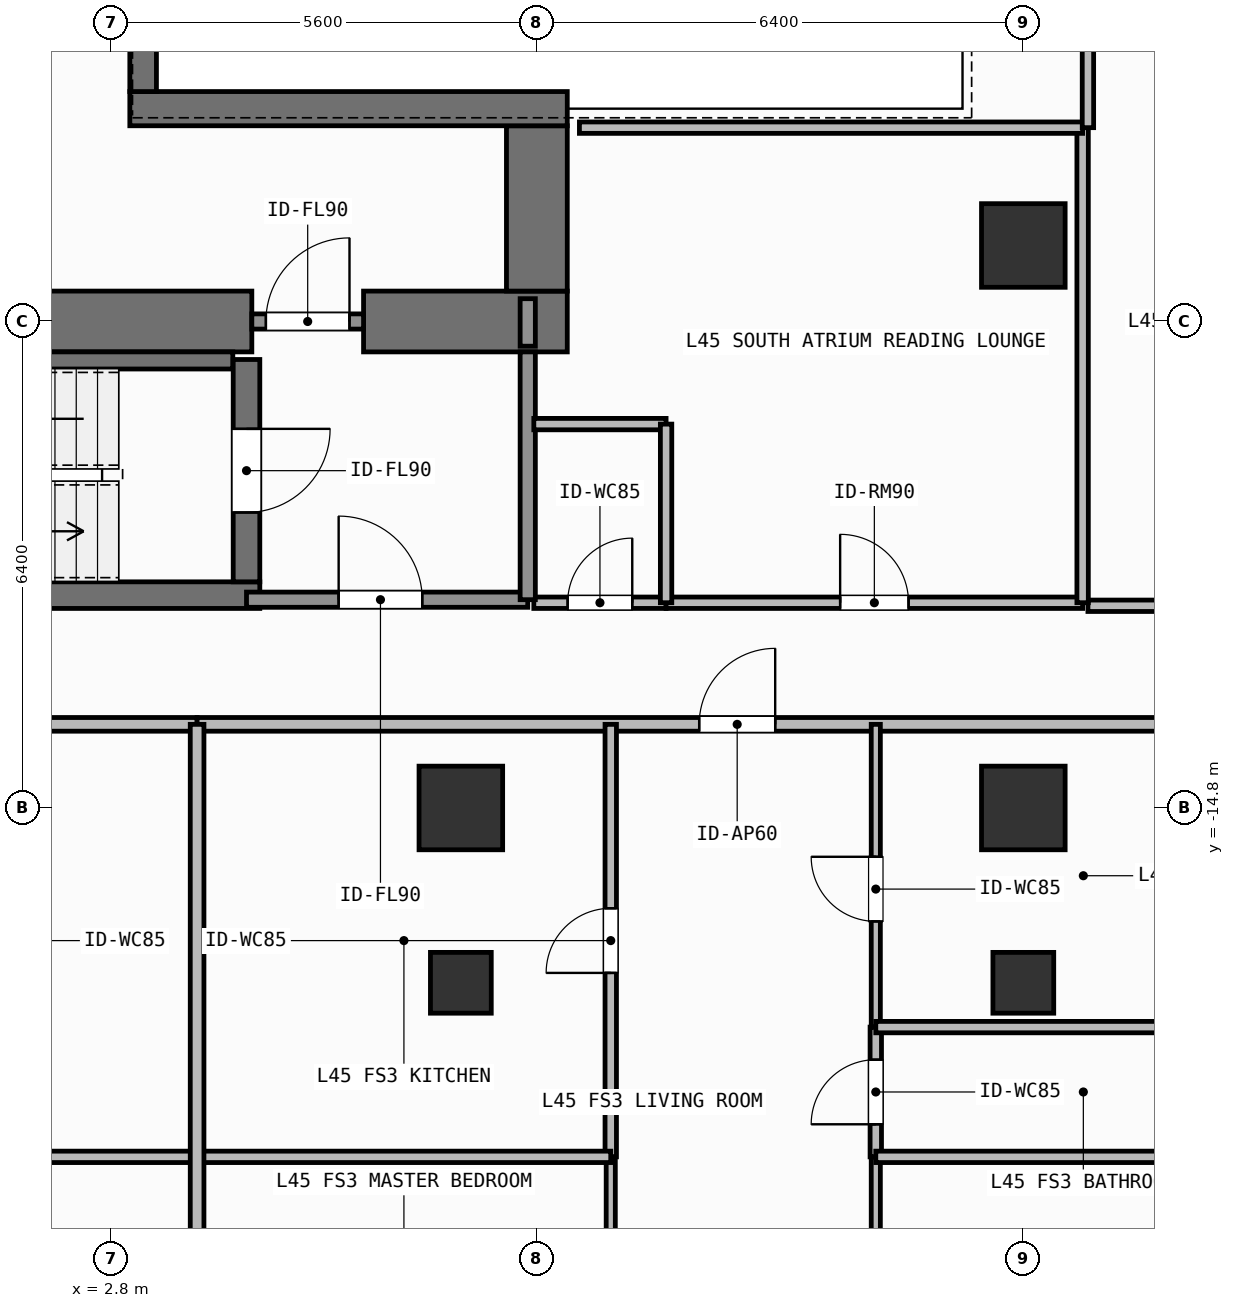
"""IFC4 building model, lengths in metres.
Left out: names, types, materials, properties, quantities, classifications, styles, units other than length and angle.
Written with IfcOpenShell. Run it as: python <this file> out.ifc"""

import sys

from ifc_helpers import new_model, si_unit, direction, frame, frame_2d, origin, origin_2d, place, context, subcontext, project, spatial, rectangle, hollow_rectangle, extrude, element, fill, save


model = new_model("IFC4")
c1 = context("Model", 3, precision=1e-05, world=origin(), true_north=direction((0.0, 1.0)))
c2 = subcontext(c1, "Body", "Model", "MODEL_VIEW")
j1 = project(units=[si_unit("LENGTHUNIT", "METRE"), si_unit("PLANEANGLEUNIT", "RADIAN")], contexts=[c1])
p1 = place(None, origin())
s1 = spatial("IfcSite", under=j1, at=p1, CompositionType="ELEMENT")
p2 = place(p1, origin())
s2 = spatial("IfcBuilding", under=s1, at=p2, CompositionType="ELEMENT")
p3 = place(p2, frame((0.0, 0.0, 183.6)))
s3 = spatial("IfcBuildingStorey", under=s2, at=p3, CompositionType="ELEMENT", Elevation=183.6)
p4 = place(p3, frame((-2.62, -8.4, 0.0), z_axis=(0.0, 0.0, 1.0), x_axis=(1.0, 0.0, 0.0)))
e1 = element("IfcWall", 1, at=p4, inside=s3, PredefinedType="SHEAR", context=c2, shape_type="SweptSolid", body=[
    extrude(rectangle(XDim=7.27, YDim=0.8, at=frame_2d((3.635, 0.0))), origin(), (0.0, 0.0, 1.0), 3.9),
])
p5 = place(p3, frame((6.12, -8.4, 0.0), z_axis=(0.0, 0.0, 1.0), x_axis=(1.0, 0.0, 0.0)))
e2 = element("IfcWall", 2, at=p5, inside=s3, PredefinedType="SHEAR", context=c2, shape_type="SweptSolid", body=[
    extrude(rectangle(XDim=2.68, YDim=0.8, at=frame_2d((1.34, 0.0))), origin(), (0.0, 0.0, 1.0), 3.9),
])
p6 = place(p3, frame((8.4, -8.0, 0.0), z_axis=(0.0, 0.0, 1.0), x_axis=(0.0, 1.0, 0.0)))
e3 = element("IfcWall", 3, at=p6, inside=s3, PredefinedType="SHEAR", context=c2, shape_type="SweptSolid", body=[
    extrude(rectangle(XDim=2.175, YDim=0.8, at=frame_2d((1.087, 0.0))), origin(), (0.0, 0.0, 1.0), 3.9),
])
p7 = place(p3, frame((3.045, -5.6, 0.0), z_axis=(0.0, 0.0, 1.0), x_axis=(1.0, 0.0, 0.0)))
e4 = element("IfcWall", 4, at=p7, inside=s3, PredefinedType="SHEAR", context=c2, shape_type="SweptSolid", body=[
    extrude(rectangle(XDim=5.755, YDim=0.45, at=frame_2d((2.877, 0.0))), origin(), (0.0, 0.0, 1.0), 3.9),
])
p8 = place(p3, frame((3.22, -5.375, 0.0), z_axis=(0.0, 0.0, 1.0), x_axis=(0.0, 1.0, 0.0)))
e5 = element("IfcWall", 5, at=p8, inside=s3, PredefinedType="SHEAR", context=c2, shape_type="SweptSolid", body=[
    extrude(rectangle(XDim=10.75, YDim=0.35, at=frame_2d((5.375, 0.0))), origin(), (0.0, 0.0, 1.0), 3.9),
])
p9 = place(p3, frame((-2.555, -12.0, 0.0), z_axis=(0.0, 0.0, 1.0), x_axis=(1.0, 0.0, 0.0)))
e6 = element("IfcWall", 6, at=p9, inside=s3, PredefinedType="SHEAR", context=c2, shape_type="SweptSolid", body=[
    extrude(rectangle(XDim=7.31, YDim=0.35, at=frame_2d((3.655, 0.0))), origin(), (0.0, 0.0, 1.0), 3.9),
])
p10 = place(p3, frame((-2.2, -8.913, 0.0), z_axis=(0.0, 0.0, 1.0), x_axis=(1.0, 0.0, 0.0)))
e7 = element("IfcWall", 7, at=p10, inside=s3, PredefinedType="SHEAR", context=c2, shape_type="SweptSolid", body=[
    extrude(rectangle(XDim=6.6, YDim=0.225, at=frame_2d((3.3, 0.0))), origin(), (0.0, 0.0, 1.0), 3.9),
])
p11 = place(p3, frame((4.58, -8.9, 0.0), z_axis=(0.0, 0.0, 1.0), x_axis=(0.0, -1.0, 0.0)))
e8 = element("IfcWall", 8, at=p11, inside=s3, PredefinedType="SHEAR", context=c2, shape_type="SweptSolid", body=[
    extrude(rectangle(XDim=2.925, YDim=0.35, at=frame_2d((1.462, 0.0))), origin(), (0.0, 0.0, 1.0), 3.9),
])
p12 = place(p11, frame((0.913, 0.0, 0.0)))
e9 = element("IfcOpeningElement", 9, at=p12, cuts=e8, PredefinedType="OPENING", context=c2, shape_type="SweptSolid", body=[
    extrude(rectangle(XDim=1.1, YDim=2.15, at=frame_2d((0.55, 1.075))), frame((0.0, 0.185, 0.0), z_axis=(0.0, -1.0, 0.0), x_axis=(1.0, 0.0, 0.0)), (0.0, 0.0, 1.0), 0.37),
])
for number, where, z_axis, x_axis in (
    (10, (7.4, -14.8, 0.0), (0.0, 0.0, 1.0), (1.0, 0.0, 0.0)),
    (11, (14.8, -14.8, 0.0), (0.0, 0.0, 1.0), (1.0, 0.0, 0.0)),
    (12, (14.8, -7.4, 0.0), (0.0, 0.0, 1.0), (1.0, 0.0, 0.0)),
):
    element("IfcColumn", number, at=place(p3, frame(where, z_axis=z_axis, x_axis=x_axis)), inside=s3, PredefinedType="COLUMN", context=c2, shape_type="SweptSolid", body=[
        extrude(rectangle(XDim=1.1, YDim=1.1, at=origin_2d()), origin(), (0.0, 0.0, 1.0), 3.9),
    ])
for number, where, z_axis, x_axis in (
    (13, (7.4, -17.1, 0.0), (0.0, 0.0, 1.0), (1.0, 0.0, 0.0)),
    (14, (14.8, -17.1, 0.0), (0.0, 0.0, 1.0), (1.0, 0.0, 0.0)),
):
    element("IfcColumn", number, at=place(p3, frame(where, z_axis=z_axis, x_axis=x_axis)), inside=s3, PredefinedType="COLUMN", context=c2, shape_type="SweptSolid", body=[
        extrude(hollow_rectangle(XDim=0.8, YDim=0.8, WallThickness=0.036, at=origin_2d()), origin(), (0.0, 0.0, 1.0), 3.9),
    ])
p13 = place(p3, frame((4.58, -12.06, 0.0), z_axis=(0.0, 0.0, 1.0), x_axis=(1.0, 0.0, 0.0)))
e15 = element("IfcWall", 15, at=p13, inside=s3, PredefinedType="SOLIDWALL", context=c2, shape_type="SweptSolid", body=[
    extrude(rectangle(XDim=3.7, YDim=0.2, at=frame_2d((1.85, 0.0))), origin(), (0.0, 0.0, 1.0), 3.68),
])
p14 = place(p13, frame((1.212, 0.0, 0.0)))
e16 = element("IfcOpeningElement", 16, at=p14, cuts=e15, PredefinedType="OPENING", context=c2, shape_type="SweptSolid", body=[
    extrude(rectangle(XDim=1.1, YDim=2.15, at=frame_2d((0.55, 1.075))), frame((0.0, 0.11, 0.0), z_axis=(0.0, -1.0, 0.0), x_axis=(1.0, 0.0, 0.0)), (0.0, 0.0, 1.0), 0.22),
])
p15 = place(p3, frame((4.65, -8.4, 0.0), z_axis=(0.0, 0.0, 1.0), x_axis=(1.0, 0.0, 0.0)))
e17 = element("IfcWall", 17, at=p15, inside=s3, PredefinedType="SOLIDWALL", context=c2, shape_type="SweptSolid", body=[
    extrude(rectangle(XDim=1.47, YDim=0.2, at=frame_2d((0.735, 0.0))), origin(), (0.0, 0.0, 1.0), 2.82),
])
p16 = place(p15, frame((0.185, 0.0, 0.0)))
e18 = element("IfcOpeningElement", 18, at=p16, cuts=e17, PredefinedType="OPENING", context=c2, shape_type="SweptSolid", body=[
    extrude(rectangle(XDim=1.1, YDim=2.15, at=frame_2d((0.55, 1.075))), frame((0.0, 0.11, 0.0), z_axis=(0.0, -1.0, 0.0), x_axis=(1.0, 0.0, 0.0)), (0.0, 0.0, 1.0), 0.22),
])
p17 = place(p3, frame((8.36, -12.1, 0.0), z_axis=(0.0, 0.0, 1.0), x_axis=(1.0, 0.0, 0.0)))
e19 = element("IfcWall", 19, at=p17, inside=s3, PredefinedType="PARTITIONING", context=c2, shape_type="SweptSolid", body=[
    extrude(rectangle(XDim=1.74, YDim=0.15, at=frame_2d((0.87, 0.0))), origin(), (0.0, 0.0, 1.0), 3.68),
])
p18 = place(p17, frame((0.445, 0.0, 0.0)))
e20 = element("IfcOpeningElement", 20, at=p18, cuts=e19, PredefinedType="OPENING", context=c2, shape_type="SweptSolid", body=[
    extrude(rectangle(XDim=0.85, YDim=2.1, at=frame_2d((0.425, 1.05))), frame((0.0, 0.085, 0.0), z_axis=(0.0, -1.0, 0.0), x_axis=(1.0, 0.0, 0.0)), (0.0, 0.0, 1.0), 0.17),
])
p19 = place(p3, frame((10.1, -12.1, 0.0), z_axis=(0.0, 0.0, 1.0), x_axis=(1.0, 0.0, 0.0)))
e21 = element("IfcWall", 21, at=p19, inside=s3, PredefinedType="PARTITIONING", context=c2, shape_type="SweptSolid", body=[
    extrude(rectangle(XDim=5.48, YDim=0.15, at=frame_2d((2.74, 0.0))), origin(), (0.0, 0.0, 1.0), 3.68),
])
p20 = place(p19, frame((2.29, 0.0, 0.0)))
e22 = element("IfcOpeningElement", 22, at=p20, cuts=e21, PredefinedType="OPENING", context=c2, shape_type="SweptSolid", body=[
    extrude(rectangle(XDim=0.9, YDim=2.1, at=frame_2d((0.45, 1.05))), frame((0.0, 0.085, 0.0), z_axis=(0.0, -1.0, 0.0), x_axis=(1.0, 0.0, 0.0)), (0.0, 0.0, 1.0), 0.17),
])
p21 = place(p3, frame((-6.618, -13.7, 0.0), z_axis=(0.0, 0.0, 1.0), x_axis=(1.0, 0.0, 0.0)))
e23 = element("IfcWall", 23, at=p21, inside=s3, PredefinedType="PARTITIONING", context=c2, shape_type="SweptSolid", body=[
    extrude(rectangle(XDim=10.548, YDim=0.18, at=frame_2d((5.274, 0.0))), origin(), (0.0, 0.0, 1.0), 3.68),
])
p22 = place(p21, frame((4.951, 0.0, 0.0)))
e24 = element("IfcOpeningElement", 24, at=p22, cuts=e23, PredefinedType="OPENING", context=c2, shape_type="SweptSolid", body=[
    extrude(rectangle(XDim=1.0, YDim=2.2, at=frame_2d((0.5, 1.1))), frame((0.0, 0.1, 0.0), z_axis=(0.0, -1.0, 0.0), x_axis=(1.0, 0.0, 0.0)), (0.0, 0.0, 1.0), 0.2),
])
p23 = place(p3, frame((3.93, -13.7, 0.0), z_axis=(0.0, 0.0, 1.0), x_axis=(1.0, 0.0, 0.0)))
e25 = element("IfcWall", 25, at=p23, inside=s3, PredefinedType="PARTITIONING", context=c2, shape_type="SweptSolid", body=[
    extrude(rectangle(XDim=14.39, YDim=0.18, at=frame_2d((7.195, 0.0))), origin(), (0.0, 0.0, 1.0), 3.68),
])
p24 = place(p23, frame((6.605, 0.0, 0.0)))
e26 = element("IfcOpeningElement", 26, at=p24, cuts=e25, PredefinedType="OPENING", context=c2, shape_type="SweptSolid", body=[
    extrude(rectangle(XDim=1.0, YDim=2.2, at=frame_2d((0.5, 1.1))), frame((0.0, 0.1, 0.0), z_axis=(0.0, -1.0, 0.0), x_axis=(1.0, 0.0, 0.0)), (0.0, 0.0, 1.0), 0.2),
])
p25 = place(p3, frame((9.372, -19.39, 0.0), z_axis=(0.0, 0.0, 1.0), x_axis=(0.0, 1.0, 0.0)))
e27 = element("IfcWall", 27, at=p25, inside=s3, PredefinedType="PARTITIONING", context=c2, shape_type="SweptSolid", body=[
    extrude(rectangle(XDim=5.69, YDim=0.15, at=frame_2d((2.845, 0.0))), origin(), (0.0, 0.0, 1.0), 3.68),
])
p26 = place(p25, frame((2.42, 0.0, 0.0)))
e28 = element("IfcOpeningElement", 28, at=p26, cuts=e27, PredefinedType="OPENING", context=c2, shape_type="SweptSolid", body=[
    extrude(rectangle(XDim=0.85, YDim=2.1, at=frame_2d((0.425, 1.05))), frame((0.0, 0.085, 0.0), z_axis=(0.0, -1.0, 0.0), x_axis=(1.0, 0.0, 0.0)), (0.0, 0.0, 1.0), 0.17),
])
p27 = place(p3, frame((9.372, -23.63, 0.0), z_axis=(0.0, 0.0, 1.0), x_axis=(0.0, 1.0, 0.0)))
e29 = element("IfcWall", 29, at=p27, inside=s3, PredefinedType="PARTITIONING", context=c2, shape_type="SweptSolid", body=[
    extrude(rectangle(XDim=4.24, YDim=0.12, at=frame_2d((2.12, 0.0))), origin(), (0.0, 0.0, 1.0), 3.68),
])
p28 = place(p27, frame((1.581, 0.0, 0.0)))
e30 = element("IfcOpeningElement", 30, at=p28, cuts=e29, PredefinedType="OPENING", context=c2, shape_type="SweptSolid", body=[
    extrude(rectangle(XDim=0.9, YDim=2.1, at=frame_2d((0.45, 1.05))), frame((0.0, 0.07, 0.0), z_axis=(0.0, -1.0, 0.0), x_axis=(1.0, 0.0, 0.0)), (0.0, 0.0, 1.0), 0.14),
])
p29 = place(p3, frame((12.859, -19.39, 0.0), z_axis=(0.0, 0.0, 1.0), x_axis=(0.0, 1.0, 0.0)))
e31 = element("IfcWall", 31, at=p29, inside=s3, PredefinedType="PARTITIONING", context=c2, shape_type="SweptSolid", body=[
    extrude(rectangle(XDim=1.707, YDim=0.15, at=frame_2d((0.854, 0.0))), origin(), (0.0, 0.0, 1.0), 3.68),
])
p30 = place(p29, frame((0.428, 0.0, 0.0)))
e32 = element("IfcOpeningElement", 32, at=p30, cuts=e31, PredefinedType="OPENING", context=c2, shape_type="SweptSolid", body=[
    extrude(rectangle(XDim=0.85, YDim=2.1, at=frame_2d((0.425, 1.05))), frame((0.0, 0.085, 0.0), z_axis=(0.0, -1.0, 0.0), x_axis=(1.0, 0.0, 0.0)), (0.0, 0.0, 1.0), 0.17),
])
p31 = place(p3, frame((12.859, -17.683, 0.0), z_axis=(0.0, 0.0, 1.0), x_axis=(0.0, 1.0, 0.0)))
e33 = element("IfcWall", 33, at=p31, inside=s3, PredefinedType="PARTITIONING", context=c2, shape_type="SweptSolid", body=[
    extrude(rectangle(XDim=3.983, YDim=0.12, at=frame_2d((1.992, 0.0))), origin(), (0.0, 0.0, 1.0), 3.68),
])
p32 = place(p31, frame((1.391, 0.0, 0.0)))
e34 = element("IfcOpeningElement", 34, at=p32, cuts=e33, PredefinedType="OPENING", context=c2, shape_type="SweptSolid", body=[
    extrude(rectangle(XDim=0.85, YDim=2.1, at=frame_2d((0.425, 1.05))), frame((0.0, 0.07, 0.0), z_axis=(0.0, -1.0, 0.0), x_axis=(1.0, 0.0, 0.0)), (0.0, 0.0, 1.0), 0.14),
])
p33 = place(p3, frame((12.859, -23.63, 0.0), z_axis=(0.0, 0.0, 1.0), x_axis=(0.0, 1.0, 0.0)))
e35 = element("IfcWall", 35, at=p33, inside=s3, PredefinedType="PARTITIONING", context=c2, shape_type="SweptSolid", body=[
    extrude(rectangle(XDim=4.24, YDim=0.12, at=frame_2d((2.12, 0.0))), origin(), (0.0, 0.0, 1.0), 3.68),
])
p34 = place(p33, frame((1.581, 0.0, 0.0)))
e36 = element("IfcOpeningElement", 36, at=p34, cuts=e35, PredefinedType="OPENING", context=c2, shape_type="SweptSolid", body=[
    extrude(rectangle(XDim=0.9, YDim=2.1, at=frame_2d((0.45, 1.05))), frame((0.0, 0.07, 0.0), z_axis=(0.0, -1.0, 0.0), x_axis=(1.0, 0.0, 0.0)), (0.0, 0.0, 1.0), 0.14),
])
p35 = place(p3, frame((15.65, -12.14, 0.0), z_axis=(0.0, 0.0, 1.0), x_axis=(1.0, 0.0, 0.0)))
e37 = element("IfcWall", 37, at=p35, inside=s3, PredefinedType="PARTITIONING", context=c2, shape_type="SweptSolid", body=[
    extrude(rectangle(XDim=6.07, YDim=0.15, at=frame_2d((3.035, 0.0))), origin(), (0.0, 0.0, 1.0), 3.68),
])
p36 = place(p35, frame((2.316, 0.0, 0.0)))
e38 = element("IfcOpeningElement", 38, at=p36, cuts=e37, PredefinedType="OPENING", context=c2, shape_type="SweptSolid", body=[
    extrude(rectangle(XDim=0.9, YDim=2.1, at=frame_2d((0.45, 1.05))), frame((0.0, 0.085, 0.0), z_axis=(0.0, -1.0, 0.0), x_axis=(1.0, 0.0, 0.0)), (0.0, 0.0, 1.0), 0.17),
])
p37 = place(p3, frame((8.28, -12.06, 0.0), z_axis=(0.0, 0.0, 1.0), x_axis=(0.0, 1.0, 0.0)))
e39 = element("IfcWall", 39, at=p37, inside=s3, PredefinedType="SOLIDWALL", context=c2, shape_type="SweptSolid", body=[
    extrude(rectangle(XDim=3.26, YDim=0.2, at=frame_2d((1.63, 0.0))), origin(), (0.0, 0.0, 1.0), 3.68),
])
p38 = place(p3, frame((8.28, -8.725, 0.0), z_axis=(0.0, 0.0, 1.0), x_axis=(0.0, 1.0, 0.0)))
e40 = element("IfcWall", 40, at=p38, inside=s3, PredefinedType="SOLIDWALL", context=c2, shape_type="SweptSolid", body=[
    extrude(rectangle(XDim=0.625, YDim=0.2, at=frame_2d((0.312, 0.0))), origin(), (0.0, 0.0, 1.0), 3.68),
])
p39 = place(p3, frame((8.36, -9.75, 0.0), z_axis=(0.0, 0.0, 1.0), x_axis=(1.0, 0.0, 0.0)))
e41 = element("IfcWall", 41, at=p39, inside=s3, PredefinedType="PARTITIONING", context=c2, shape_type="SweptSolid", body=[
    extrude(rectangle(XDim=1.74, YDim=0.15, at=frame_2d((0.87, 0.0))), origin(), (0.0, 0.0, 1.0), 3.68),
])
p40 = place(p3, frame((10.1, -12.1, 0.0), z_axis=(0.0, 0.0, 1.0), x_axis=(0.0, 1.0, 0.0)))
e42 = element("IfcWall", 42, at=p40, inside=s3, PredefinedType="PARTITIONING", context=c2, shape_type="SweptSolid", body=[
    extrude(rectangle(XDim=2.35, YDim=0.15, at=frame_2d((1.175, 0.0))), origin(), (0.0, 0.0, 1.0), 3.68),
])
p41 = place(p3, frame((15.58, -12.1, 0.0), z_axis=(0.0, 0.0, 1.0), x_axis=(0.0, 1.0, 0.0)))
e43 = element("IfcWall", 43, at=p41, inside=s3, PredefinedType="PARTITIONING", context=c2, shape_type="SweptSolid", body=[
    extrude(rectangle(XDim=6.25, YDim=0.15, at=frame_2d((3.125, 0.0))), origin(), (0.0, 0.0, 1.0), 3.68),
])
p42 = place(p3, frame((8.96, -5.85, 0.0), z_axis=(0.0, 0.0, 1.0), x_axis=(1.0, 0.0, 0.0)))
e44 = element("IfcWall", 44, at=p42, inside=s3, PredefinedType="PARTITIONING", context=c2, shape_type="SweptSolid", body=[
    extrude(rectangle(XDim=6.62, YDim=0.15, at=frame_2d((3.31, 0.0))), origin(), (0.0, 0.0, 1.0), 3.68),
])
p43 = place(p3, frame((1.08, -19.39, 0.0), z_axis=(0.0, 0.0, 1.0), x_axis=(1.0, 0.0, 0.0)))
e45 = element("IfcWall", 45, at=p43, inside=s3, PredefinedType="PARTITIONING", context=c2, shape_type="SweptSolid", body=[
    extrude(rectangle(XDim=2.85, YDim=0.15, at=frame_2d((1.425, 0.0))), origin(), (0.0, 0.0, 1.0), 3.68),
])
p44 = place(p3, frame((3.93, -19.39, 0.0), z_axis=(0.0, 0.0, 1.0), x_axis=(1.0, 0.0, 0.0)))
e46 = element("IfcWall", 46, at=p44, inside=s3, PredefinedType="PARTITIONING", context=c2, shape_type="SweptSolid", body=[
    extrude(rectangle(XDim=5.442, YDim=0.15, at=frame_2d((2.721, 0.0))), origin(), (0.0, 0.0, 1.0), 3.68),
])
for number, where, z_axis, x_axis in (
    (47, (12.859, -17.683, 0.0), (0.0, 0.0, 1.0), (1.0, 0.0, 0.0)),
    (48, (12.859, -19.39, 0.0), (0.0, 0.0, 1.0), (1.0, 0.0, 0.0)),
):
    element("IfcWall", number, at=place(p3, frame(where, z_axis=z_axis, x_axis=x_axis)), inside=s3, PredefinedType="PARTITIONING", context=c2, shape_type="SweptSolid", body=[
        extrude(rectangle(XDim=5.461, YDim=0.15, at=frame_2d((2.73, 0.0))), origin(), (0.0, 0.0, 1.0), 3.68),
    ])
p45 = place(p3, frame((3.93, -23.63, 0.0), z_axis=(0.0, 0.0, 1.0), x_axis=(0.0, 1.0, 0.0)))
e49 = element("IfcWall", 49, at=p45, inside=s3, PredefinedType="PARTITIONING", context=c2, shape_type="SweptSolid", body=[
    extrude(rectangle(XDim=9.93, YDim=0.18, at=frame_2d((4.965, 0.0))), origin(), (0.0, 0.0, 1.0), 3.68),
])
p46 = place(p3, frame((15.65, -5.85, 0.0), z_axis=(0.0, 0.0, 1.0), x_axis=(0.0, 1.0, 0.0)))
e50 = element("IfcWall", 50, at=p46, inside=s3, PredefinedType="PARTITIONING", context=c2, shape_type="SweptSolid", body=[
    extrude(rectangle(XDim=1.2, YDim=0.15, at=frame_2d((0.6, 0.0))), origin(), (0.0, 0.0, 1.0), 3.68),
])
p47 = place(p12, origin())
e51 = element("IfcDoor", 51, at=p47, inside=s3, OperationType="SINGLE_SWING_LEFT", PredefinedType="DOOR", context=c2, shape_type="SweptSolid", body=[
    extrude(rectangle(XDim=1.1, YDim=2.15, at=frame_2d((0.55, 1.075))), frame((0.0, 0.025, 0.0), z_axis=(0.0, -1.0, 0.0), x_axis=(1.0, 0.0, 0.0)), (0.0, 0.0, 1.0), 0.05),
])
fill(e9, e51)
p48 = place(p14, origin())
e52 = element("IfcDoor", 52, at=p48, inside=s3, OperationType="SINGLE_SWING_LEFT", PredefinedType="DOOR", context=c2, shape_type="SweptSolid", body=[
    extrude(rectangle(XDim=1.1, YDim=2.15, at=frame_2d((0.55, 1.075))), frame((0.0, 0.025, 0.0), z_axis=(0.0, -1.0, 0.0), x_axis=(1.0, 0.0, 0.0)), (0.0, 0.0, 1.0), 0.05),
])
fill(e16, e52)
p49 = place(p16, origin())
e53 = element("IfcDoor", 53, at=p49, inside=s3, OperationType="SINGLE_SWING_RIGHT", PredefinedType="DOOR", context=c2, shape_type="SweptSolid", body=[
    extrude(rectangle(XDim=1.1, YDim=2.15, at=frame_2d((0.55, 1.075))), frame((0.0, 0.025, 0.0), z_axis=(0.0, -1.0, 0.0), x_axis=(1.0, 0.0, 0.0)), (0.0, 0.0, 1.0), 0.05),
])
fill(e18, e53)
p50 = place(p18, origin())
e54 = element("IfcDoor", 54, at=p50, inside=s3, OperationType="SINGLE_SWING_RIGHT", PredefinedType="DOOR", context=c2, shape_type="SweptSolid", body=[
    extrude(rectangle(XDim=0.85, YDim=2.1, at=frame_2d((0.425, 1.05))), frame((0.0, 0.025, 0.0), z_axis=(0.0, -1.0, 0.0), x_axis=(1.0, 0.0, 0.0)), (0.0, 0.0, 1.0), 0.05),
])
fill(e20, e54)
p51 = place(p20, origin())
e55 = element("IfcDoor", 55, at=p51, inside=s3, OperationType="SINGLE_SWING_LEFT", PredefinedType="DOOR", context=c2, shape_type="SweptSolid", body=[
    extrude(rectangle(XDim=0.9, YDim=2.1, at=frame_2d((0.45, 1.05))), frame((0.0, 0.025, 0.0), z_axis=(0.0, -1.0, 0.0), x_axis=(1.0, 0.0, 0.0)), (0.0, 0.0, 1.0), 0.05),
])
fill(e22, e55)
p52 = place(p24, origin())
e56 = element("IfcDoor", 56, at=p52, inside=s3, OperationType="SINGLE_SWING_RIGHT", PredefinedType="DOOR", context=c2, shape_type="SweptSolid", body=[
    extrude(rectangle(XDim=1.0, YDim=2.2, at=frame_2d((0.5, 1.1))), frame((0.0, 0.025, 0.0), z_axis=(0.0, -1.0, 0.0), x_axis=(1.0, 0.0, 0.0)), (0.0, 0.0, 1.0), 0.05),
])
fill(e26, e56)
p53 = place(p26, origin())
e57 = element("IfcDoor", 57, at=p53, inside=s3, OperationType="SINGLE_SWING_LEFT", PredefinedType="DOOR", context=c2, shape_type="SweptSolid", body=[
    extrude(rectangle(XDim=0.85, YDim=2.1, at=frame_2d((0.425, 1.05))), frame((0.0, 0.025, 0.0), z_axis=(0.0, -1.0, 0.0), x_axis=(1.0, 0.0, 0.0)), (0.0, 0.0, 1.0), 0.05),
])
fill(e28, e57)
p54 = place(p30, origin())
e58 = element("IfcDoor", 58, at=p54, inside=s3, OperationType="SINGLE_SWING_LEFT", PredefinedType="DOOR", context=c2, shape_type="SweptSolid", body=[
    extrude(rectangle(XDim=0.85, YDim=2.1, at=frame_2d((0.425, 1.05))), frame((0.0, 0.025, 0.0), z_axis=(0.0, -1.0, 0.0), x_axis=(1.0, 0.0, 0.0)), (0.0, 0.0, 1.0), 0.05),
])
fill(e32, e58)
p55 = place(p32, origin())
e59 = element("IfcDoor", 59, at=p55, inside=s3, OperationType="SINGLE_SWING_RIGHT", PredefinedType="DOOR", context=c2, shape_type="SweptSolid", body=[
    extrude(rectangle(XDim=0.85, YDim=2.1, at=frame_2d((0.425, 1.05))), frame((0.0, 0.025, 0.0), z_axis=(0.0, -1.0, 0.0), x_axis=(1.0, 0.0, 0.0)), (0.0, 0.0, 1.0), 0.05),
])
fill(e34, e59)
save(model, sys.argv[1])
